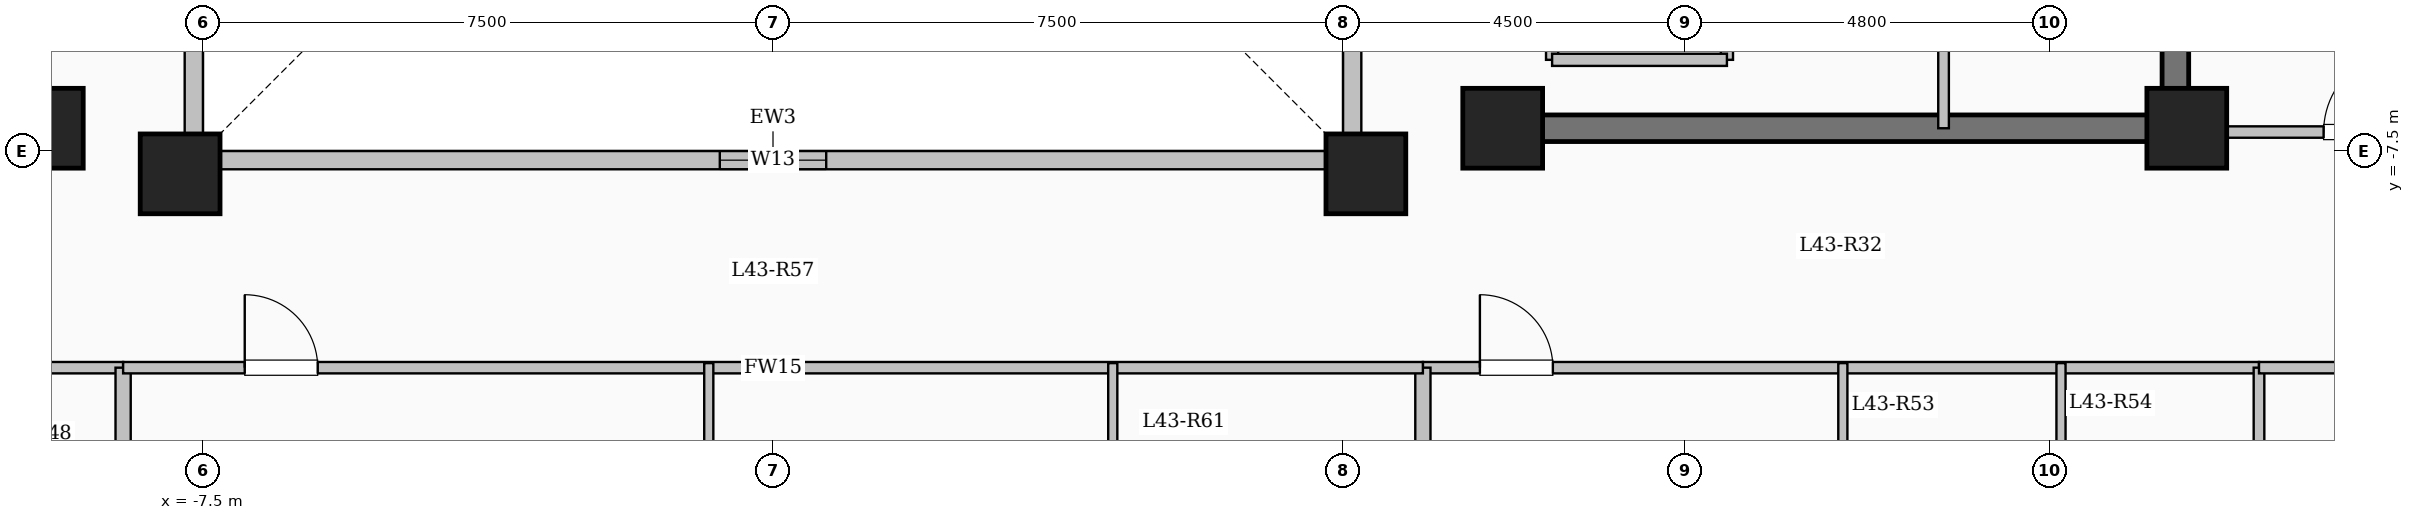
"""IFC4 building model, lengths in metres.
Left out: names, types, materials, properties, quantities, classifications, styles, units other than length and angle.
Written with IfcOpenShell. Run it as: python <this file> out.ifc"""

import sys

from ifc_helpers import new_model, si_unit, direction, frame, frame_2d, origin, origin_2d, place, context, subcontext, project, spatial, rectangle, extrude, element, fill, save


model = new_model("IFC4")
c1 = context("Model", 3, precision=1e-05, world=origin(), true_north=direction((0.0, 1.0)))
c2 = subcontext(c1, "Body", "Model", "MODEL_VIEW")
j1 = project(units=[si_unit("LENGTHUNIT", "METRE"), si_unit("PLANEANGLEUNIT", "RADIAN")], contexts=[c1])
p1 = place(None, origin())
s1 = spatial("IfcSite", under=j1, at=p1, CompositionType="ELEMENT")
p2 = place(p1, origin())
s2 = spatial("IfcBuilding", under=s1, at=p2, CompositionType="ELEMENT")
p3 = place(p2, frame((0.0, 0.0, 159.4)))
s3 = spatial("IfcBuildingStorey", under=s2, at=p3, CompositionType="ELEMENT", Elevation=159.4)
for number, where, z_axis, x_axis in (
    (1, (-7.8, -7.8, 0.0), (0.0, 0.0, 1.0), (1.0, 0.0, 0.0)),
    (2, (7.8, -7.8, 0.0), (0.0, 0.0, 1.0), (1.0, 0.0, 0.0)),
    (3, (-9.6, -7.2, 0.0), (0.0, 0.0, 1.0), (1.0, 0.0, 0.0)),
    (4, (9.6, -7.2, 0.0), (0.0, 0.0, 1.0), (1.0, 0.0, 0.0)),
    (5, (18.6, -7.2, 0.0), (0.0, 0.0, 1.0), (1.0, 0.0, 0.0)),
):
    element("IfcColumn", number, at=place(p3, frame(where, z_axis=z_axis, x_axis=x_axis)), inside=s3, PredefinedType="COLUMN", context=c2, shape_type="SweptSolid", body=[
        extrude(rectangle(XDim=1.05, YDim=1.05, at=origin_2d()), origin(), (0.0, 0.0, 1.0), 3.35),
    ])
p4 = place(p3, frame((-7.62, -7.62, 0.0), z_axis=(0.0, 0.0, 1.0), x_axis=(1.0, 0.0, 0.0)))
e6 = element("IfcWall", 6, at=p4, inside=s3, PredefinedType="SOLIDWALL", context=c2, shape_type="SweptSolid", body=[
    extrude(rectangle(XDim=15.24, YDim=0.24, at=frame_2d((7.62, 0.0))), origin(), (0.0, 0.0, 1.0), 3.1),
])
p5 = place(p4, frame((6.92, 0.0, 0.95)))
e7 = element("IfcOpeningElement", 7, at=p5, cuts=e6, PredefinedType="OPENING", context=c2, shape_type="SweptSolid", body=[
    extrude(rectangle(XDim=1.4, YDim=1.5, at=frame_2d((0.7, 0.75))), frame((0.0, 0.13, 0.0), z_axis=(0.0, -1.0, 0.0), x_axis=(1.0, 0.0, 0.0)), (0.0, 0.0, 1.0), 0.26),
])
p6 = place(p3, frame((7.62, -7.62, 0.0), z_axis=(0.0, 0.0, 1.0), x_axis=(0.0, 1.0, 0.0)))
e8 = element("IfcWall", 8, at=p6, inside=s3, PredefinedType="SOLIDWALL", context=c2, shape_type="SweptSolid", body=[
    extrude(rectangle(XDim=15.24, YDim=0.24, at=frame_2d((7.62, 0.0))), origin(), (0.0, 0.0, 1.0), 3.1),
])
p7 = place(p6, frame((6.92, 0.0, 0.95)))
e9 = element("IfcOpeningElement", 9, at=p7, cuts=e8, PredefinedType="OPENING", context=c2, shape_type="SweptSolid", body=[
    extrude(rectangle(XDim=1.4, YDim=1.5, at=frame_2d((0.7, 0.75))), frame((0.0, 0.13, 0.0), z_axis=(0.0, -1.0, 0.0), x_axis=(1.0, 0.0, 0.0)), (0.0, 0.0, 1.0), 0.26),
])
p8 = place(p3, frame((-7.62, 7.62, 0.0), z_axis=(0.0, 0.0, 1.0), x_axis=(0.0, -1.0, 0.0)))
e10 = element("IfcWall", 10, at=p8, inside=s3, PredefinedType="SOLIDWALL", context=c2, shape_type="SweptSolid", body=[
    extrude(rectangle(XDim=15.24, YDim=0.24, at=frame_2d((7.62, 0.0))), origin(), (0.0, 0.0, 1.0), 3.1),
])
p9 = place(p8, frame((6.92, 0.0, 0.95)))
e11 = element("IfcOpeningElement", 11, at=p9, cuts=e10, PredefinedType="OPENING", context=c2, shape_type="SweptSolid", body=[
    extrude(rectangle(XDim=1.4, YDim=1.5, at=frame_2d((0.7, 0.75))), frame((0.0, 0.13, 0.0), z_axis=(0.0, -1.0, 0.0), x_axis=(1.0, 0.0, 0.0)), (0.0, 0.0, 1.0), 0.26),
])
p10 = place(p3, frame((10.25, -6.3, 0.0), z_axis=(0.0, 0.0, 1.0), x_axis=(0.0, 1.0, 0.0)))
e12 = element("IfcWall", 12, at=p10, inside=s3, PredefinedType="SOLIDWALL", context=c2, shape_type="SweptSolid", body=[
    extrude(rectangle(XDim=2.6, YDim=0.16, at=frame_2d((1.3, 0.0))), origin(), (0.0, 0.0, 1.0), 3.1),
])
p11 = place(p10, frame((0.75, 0.0, 0.0)))
e13 = element("IfcOpeningElement", 13, at=p11, cuts=e12, PredefinedType="OPENING", context=c2, shape_type="SweptSolid", body=[
    extrude(rectangle(XDim=1.1, YDim=2.15, at=frame_2d((0.55, 1.075))), frame((0.0, 0.09, 0.0), z_axis=(0.0, -1.0, 0.0), x_axis=(1.0, 0.0, 0.0)), (0.0, 0.0, 1.0), 0.18),
])
p12 = place(p3, frame((12.55, -6.3, 0.0), z_axis=(0.0, 0.0, 1.0), x_axis=(0.0, 1.0, 0.0)))
e14 = element("IfcWall", 14, at=p12, inside=s3, PredefinedType="SOLIDWALL", context=c2, shape_type="SweptSolid", body=[
    extrude(rectangle(XDim=2.6, YDim=0.16, at=frame_2d((1.3, 0.0))), origin(), (0.0, 0.0, 1.0), 3.1),
])
p13 = place(p3, frame((10.25, -6.3, 0.0), z_axis=(0.0, 0.0, 1.0), x_axis=(1.0, 0.0, 0.0)))
e15 = element("IfcWall", 15, at=p13, inside=s3, PredefinedType="SOLIDWALL", context=c2, shape_type="SweptSolid", body=[
    extrude(rectangle(XDim=2.3, YDim=0.16, at=frame_2d((1.15, 0.0))), origin(), (0.0, 0.0, 1.0), 3.1),
])
p14 = place(p3, frame((18.45, -7.375, 0.0), z_axis=(0.0, 0.0, 1.0), x_axis=(0.0, 1.0, 0.0)))
e16 = element("IfcWall", 16, at=p14, inside=s3, PredefinedType="SHEAR", context=c2, shape_type="SweptSolid", body=[
    extrude(rectangle(XDim=14.05, YDim=0.35, at=frame_2d((7.025, 0.0))), origin(), (0.0, 0.0, 1.0), 3.35),
])
p15 = place(p3, frame((10.075, -7.2, 0.0), z_axis=(0.0, 0.0, 1.0), x_axis=(1.0, 0.0, 0.0)))
e17 = element("IfcWall", 17, at=p15, inside=s3, PredefinedType="SHEAR", context=c2, shape_type="SweptSolid", body=[
    extrude(rectangle(XDim=8.55, YDim=0.35, at=frame_2d((4.275, 0.0))), origin(), (0.0, 0.0, 1.0), 3.35),
])
p16 = place(p3, frame((15.4, -7.2, 0.0), z_axis=(0.0, 0.0, 1.0), x_axis=(0.0, 1.0, 0.0)))
e18 = element("IfcWall", 18, at=p16, inside=s3, PredefinedType="PARTITIONING", context=c2, shape_type="SweptSolid", body=[
    extrude(rectangle(XDim=10.45, YDim=0.14, at=frame_2d((5.225, 0.0))), origin(), (0.0, 0.0, 1.0), 3.1),
])
p17 = place(p16, frame((9.25, 0.0, 0.0)))
e19 = element("IfcOpeningElement", 19, at=p17, cuts=e18, PredefinedType="OPENING", context=c2, shape_type="SweptSolid", body=[
    extrude(rectangle(XDim=0.9, YDim=2.08, at=frame_2d((0.45, 1.04))), frame((0.0, 0.08, 0.0), z_axis=(0.0, -1.0, 0.0), x_axis=(1.0, 0.0, 0.0)), (0.0, 0.0, 1.0), 0.16),
])
p18 = place(p3, frame((-19.55, -10.35, 0.0), z_axis=(0.0, 0.0, 1.0), x_axis=(1.0, 0.0, 0.0)))
e20 = element("IfcWall", 20, at=p18, inside=s3, PredefinedType="PARTITIONING", context=c2, shape_type="SweptSolid", body=[
    extrude(rectangle(XDim=11.0, YDim=0.15, at=frame_2d((5.5, 0.0))), origin(), (0.0, 0.0, 1.0), 3.1),
])
p19 = place(p18, frame((0.7, 0.0, 0.0)))
e21 = element("IfcOpeningElement", 21, at=p19, cuts=e20, PredefinedType="OPENING", context=c2, shape_type="SweptSolid", body=[
    extrude(rectangle(XDim=0.96, YDim=2.15, at=frame_2d((0.48, 1.075))), frame((0.0, 0.085, 0.0), z_axis=(0.0, -1.0, 0.0), x_axis=(1.0, 0.0, 0.0)), (0.0, 0.0, 1.0), 0.17),
])
p20 = place(p3, frame((8.55, -10.35, 0.0), z_axis=(0.0, 0.0, 1.0), x_axis=(1.0, 0.0, 0.0)))
e22 = element("IfcWall", 22, at=p20, inside=s3, PredefinedType="PARTITIONING", context=c2, shape_type="SweptSolid", body=[
    extrude(rectangle(XDim=11.0, YDim=0.15, at=frame_2d((5.5, 0.0))), origin(), (0.0, 0.0, 1.0), 3.1),
])
p21 = place(p20, frame((0.75, 0.0, 0.0)))
e23 = element("IfcOpeningElement", 23, at=p21, cuts=e22, PredefinedType="OPENING", context=c2, shape_type="SweptSolid", body=[
    extrude(rectangle(XDim=0.96, YDim=2.15, at=frame_2d((0.48, 1.075))), frame((0.0, 0.085, 0.0), z_axis=(0.0, -1.0, 0.0), x_axis=(1.0, 0.0, 0.0)), (0.0, 0.0, 1.0), 0.17),
])
p22 = place(p3, frame((14.075, -21.2, 0.0), z_axis=(0.0, 0.0, 1.0), x_axis=(0.0, 1.0, 0.0)))
e24 = element("IfcWall", 24, at=p22, inside=s3, PredefinedType="PARTITIONING", context=c2, shape_type="SweptSolid", body=[
    extrude(rectangle(XDim=10.91, YDim=0.12, at=frame_2d((5.455, 0.0))), origin(), (0.0, 0.0, 1.0), 3.1),
])
p23 = place(p22, frame((7.085, 0.0, 0.0)))
e25 = element("IfcOpeningElement", 25, at=p23, cuts=e24, PredefinedType="OPENING", context=c2, shape_type="SweptSolid", body=[
    extrude(rectangle(XDim=1.08, YDim=2.15, at=frame_2d((0.54, 1.075))), frame((0.0, 0.07, 0.0), z_axis=(0.0, -1.0, 0.0), x_axis=(1.0, 0.0, 0.0)), (0.0, 0.0, 1.0), 0.14),
])
p24 = place(p3, frame((16.945, -12.75, 0.0), z_axis=(0.0, 0.0, 1.0), x_axis=(0.0, 1.0, 0.0)))
e26 = element("IfcWall", 26, at=p24, inside=s3, PredefinedType="PARTITIONING", context=c2, shape_type="SweptSolid", body=[
    extrude(rectangle(XDim=2.46, YDim=0.12, at=frame_2d((1.23, 0.0))), origin(), (0.0, 0.0, 1.0), 3.1),
])
for number, where, z_axis, x_axis in (
    (27, (-8.55, -21.804, 0.0), (0.0, 0.0, 1.0), (0.0, 1.0, 0.0)),
    (28, (8.55, -21.804, 0.0), (0.0, 0.0, 1.0), (0.0, 1.0, 0.0)),
):
    element("IfcWall", number, at=place(p3, frame(where, z_axis=z_axis, x_axis=x_axis)), inside=s3, PredefinedType="SOLIDWALL", context=c2, shape_type="SweptSolid", body=[
        extrude(rectangle(XDim=11.454, YDim=0.2, at=frame_2d((5.727, 0.0))), origin(), (0.0, 0.0, 1.0), 3.1),
    ])
p25 = place(p3, frame((-8.55, -10.35, 0.0), z_axis=(0.0, 0.0, 1.0), x_axis=(1.0, 0.0, 0.0)))
e29 = element("IfcWall", 29, at=p25, inside=s3, PredefinedType="PARTITIONING", context=c2, shape_type="SweptSolid", body=[
    extrude(rectangle(XDim=17.1, YDim=0.15, at=frame_2d((8.55, 0.0))), origin(), (0.0, 0.0, 1.0), 3.1),
])
p26 = place(p25, frame((1.6, 0.0, 0.0)))
e30 = element("IfcOpeningElement", 30, at=p26, cuts=e29, PredefinedType="OPENING", context=c2, shape_type="SweptSolid", body=[
    extrude(rectangle(XDim=0.96, YDim=2.15, at=frame_2d((0.48, 1.075))), frame((0.0, 0.085, 0.0), z_axis=(0.0, -1.0, 0.0), x_axis=(1.0, 0.0, 0.0)), (0.0, 0.0, 1.0), 0.17),
])
p27 = place(p3, frame((-0.845, -22.68, 0.0), z_axis=(0.0, 0.0, 1.0), x_axis=(0.0, 1.0, 0.0)))
e31 = element("IfcWall", 31, at=p27, inside=s3, PredefinedType="PARTITIONING", context=c2, shape_type="SweptSolid", body=[
    extrude(rectangle(XDim=12.39, YDim=0.12, at=frame_2d((6.195, 0.0))), origin(), (0.0, 0.0, 1.0), 3.1),
])
p28 = place(p27, frame((8.395, 0.0, 0.0)))
e32 = element("IfcOpeningElement", 32, at=p28, cuts=e31, PredefinedType="OPENING", context=c2, shape_type="SweptSolid", body=[
    extrude(rectangle(XDim=1.08, YDim=2.15, at=frame_2d((0.54, 1.075))), frame((0.0, 0.07, 0.0), z_axis=(0.0, -1.0, 0.0), x_axis=(1.0, 0.0, 0.0)), (0.0, 0.0, 1.0), 0.14),
])
p29 = place(p3, frame((4.47, -12.92, 0.0), z_axis=(0.0, 0.0, 1.0), x_axis=(0.0, 1.0, 0.0)))
e33 = element("IfcWall", 33, at=p29, inside=s3, PredefinedType="PARTITIONING", context=c2, shape_type="SweptSolid", body=[
    extrude(rectangle(XDim=2.63, YDim=0.12, at=frame_2d((1.315, 0.0))), origin(), (0.0, 0.0, 1.0), 3.1),
])
p30 = place(p3, frame((18.45, -7.25, 0.0), z_axis=(0.0, 0.0, 1.0), x_axis=(1.0, 0.0, 0.0)))
e34 = element("IfcWall", 34, at=p30, inside=s3, PredefinedType="PARTITIONING", context=c2, shape_type="SweptSolid", body=[
    extrude(rectangle(XDim=6.63, YDim=0.15, at=frame_2d((3.315, 0.0))), origin(), (0.0, 0.0, 1.0), 3.1),
])
p31 = place(p30, frame((1.95, 0.0, 0.0)))
e35 = element("IfcOpeningElement", 35, at=p31, cuts=e34, PredefinedType="OPENING", context=c2, shape_type="SweptSolid", body=[
    extrude(rectangle(XDim=1.08, YDim=2.15, at=frame_2d((0.54, 1.075))), frame((0.0, 0.085, 0.0), z_axis=(0.0, -1.0, 0.0), x_axis=(1.0, 0.0, 0.0)), (0.0, 0.0, 1.0), 0.17),
])
p32 = place(p3, frame((19.55, -17.25, 0.0), z_axis=(0.0, 0.0, 1.0), x_axis=(0.0, 1.0, 0.0)))
e36 = element("IfcWall", 36, at=p32, inside=s3, PredefinedType="PARTITIONING", context=c2, shape_type="SweptSolid", body=[
    extrude(rectangle(XDim=6.9, YDim=0.14, at=frame_2d((3.45, 0.0))), origin(), (0.0, 0.0, 1.0), 3.1),
])
p33 = place(p3, frame((19.55, -10.35, 0.0), z_axis=(0.0, 0.0, 1.0), x_axis=(1.0, 0.0, 0.0)))
e37 = element("IfcWall", 37, at=p33, inside=s3, PredefinedType="PARTITIONING", context=c2, shape_type="SweptSolid", body=[
    extrude(rectangle(XDim=5.53, YDim=0.15, at=frame_2d((2.765, 0.0))), origin(), (0.0, 0.0, 1.0), 3.1),
])
p34 = place(p33, frame((2.29, 0.0, 0.0)))
e38 = element("IfcOpeningElement", 38, at=p34, cuts=e37, PredefinedType="OPENING", context=c2, shape_type="SweptSolid", body=[
    extrude(rectangle(XDim=0.95, YDim=2.15, at=frame_2d((0.475, 1.075))), frame((0.0, 0.085, 0.0), z_axis=(0.0, -1.0, 0.0), x_axis=(1.0, 0.0, 0.0)), (0.0, 0.0, 1.0), 0.17),
])
p35 = place(p5, origin())
e39 = element("IfcWindow", 39, at=p35, inside=s3, PartitioningType="SINGLE_PANEL", PredefinedType="WINDOW", context=c2, shape_type="SweptSolid", body=[
    extrude(rectangle(XDim=1.4, YDim=1.5, at=frame_2d((0.7, 0.75))), frame((0.0, 0.03, 0.0), z_axis=(0.0, -1.0, 0.0), x_axis=(1.0, 0.0, 0.0)), (0.0, 0.0, 1.0), 0.06),
])
fill(e7, e39)
p36 = place(p21, origin())
e40 = element("IfcDoor", 40, at=p36, inside=s3, OperationType="SINGLE_SWING_LEFT", PredefinedType="DOOR", context=c2, shape_type="SweptSolid", body=[
    extrude(rectangle(XDim=0.96, YDim=2.15, at=frame_2d((0.48, 1.075))), frame((0.0, 0.025, 0.0), z_axis=(0.0, -1.0, 0.0), x_axis=(1.0, 0.0, 0.0)), (0.0, 0.0, 1.0), 0.05),
])
fill(e23, e40)
p37 = place(p26, origin())
e41 = element("IfcDoor", 41, at=p37, inside=s3, OperationType="SINGLE_SWING_LEFT", PredefinedType="DOOR", context=c2, shape_type="SweptSolid", body=[
    extrude(rectangle(XDim=0.96, YDim=2.15, at=frame_2d((0.48, 1.075))), frame((0.0, 0.025, 0.0), z_axis=(0.0, -1.0, 0.0), x_axis=(1.0, 0.0, 0.0)), (0.0, 0.0, 1.0), 0.05),
])
fill(e30, e41)
p38 = place(p31, origin())
e42 = element("IfcDoor", 42, at=p38, inside=s3, OperationType="SINGLE_SWING_RIGHT", PredefinedType="DOOR", context=c2, shape_type="SweptSolid", body=[
    extrude(rectangle(XDim=1.08, YDim=2.15, at=frame_2d((0.54, 1.075))), frame((0.0, 0.025, 0.0), z_axis=(0.0, -1.0, 0.0), x_axis=(1.0, 0.0, 0.0)), (0.0, 0.0, 1.0), 0.05),
])
fill(e35, e42)
save(model, sys.argv[1])
